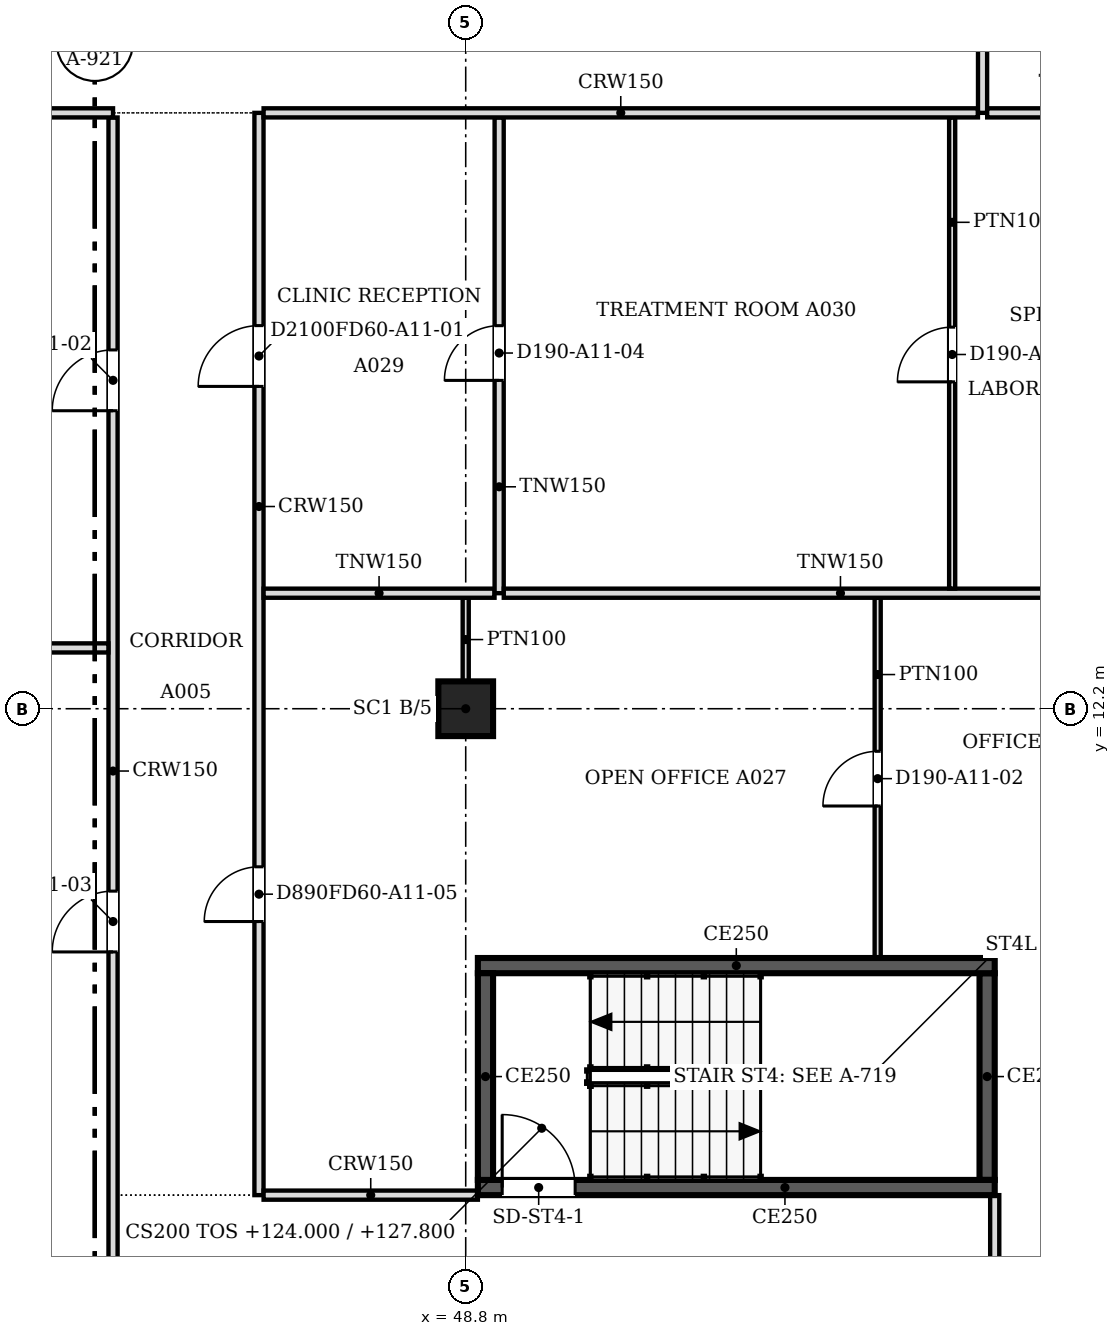
"""IFC4 building model, lengths in metres.
Left out: names, types, materials, properties, quantities, classifications, styles, units other than length and angle.
Written with IfcOpenShell. Run it as: python <this file> out.ifc"""

import sys

from ifc_helpers import new_model, si_unit, direction, frame, frame_2d, origin, origin_2d, place, context, subcontext, project, spatial, polyline, rectangle, outline, extrude, faceted_brep, source, transform, mapped, element, fill, save


model = new_model("IFC4")
c1 = context("Model", 3, precision=1e-05, world=origin(), true_north=direction((0.0, 1.0)))
c2 = subcontext(c1, "Body", "Model", "MODEL_VIEW")
j1 = project(units=[si_unit("LENGTHUNIT", "METRE"), si_unit("PLANEANGLEUNIT", "RADIAN")], contexts=[c1])
p1 = place(None, origin())
s1 = spatial("IfcSite", under=j1, at=p1, CompositionType="ELEMENT")
p2 = place(p1, origin())
s2 = spatial("IfcBuilding", under=s1, at=p2, CompositionType="ELEMENT")
p3 = place(p2, frame((0.0, 0.0, 124.0)))
s3 = spatial("IfcBuildingStorey", under=s2, at=p3, CompositionType="ELEMENT", Elevation=124.0)
p4 = place(p3, frame((48.8, 12.2, 0.0), z_axis=(0.0, 0.0, 1.0), x_axis=(1.0, 0.0, 0.0)))
e1 = element("IfcColumn", 1, at=p4, inside=s3, PredefinedType="COLUMN", context=c2, shape_type="SweptSolid", body=[
    extrude(rectangle(XDim=0.9, YDim=0.9, at=origin_2d()), origin(), (0.0, 0.0, 1.0), 3.6),
])
m1 = source(origin(), c2, "Body", "Brep", [
    faceted_brep([(0.053, -0.25, 0.0), (2.997, -0.25, 3.8), (0.053, -0.25, 7.6), (0.0, -0.25, 7.532), (0.0, -0.25, 0.068), (0.106, 0.25, 7.532), (2.944, 0.25, 3.868), (2.944, 0.25, 3.732), (0.106, 0.25, 0.068), (2.997, 0.0, 3.8), (0.053, 0.0, 0.0), (0.053, 0.0, 7.6)], [[[0, 1, 2, 3, 4]], [[5, 6, 7, 8]], [[8, 7, 9, 1, 0, 10]], [[6, 5, 11, 2, 1, 9]], [[3, 2, 11]], [[10, 0, 4]], [[8, 10, 4, 3, 11, 5]], [[9, 7, 6]]]),
])
p5 = place(p3, frame((57.569, 1.274, -3.8), z_axis=(0.0, 0.0, 1.0), x_axis=(0.707066050402, 0.707147509625, 0.0)))
e2 = element("IfcWall", 2, at=p5, inside=s3, PredefinedType="SOLIDWALL", context=c2, shape_type="MappedRepresentation", body=[
    mapped(m1, transform((0.0, 0.0, 0.0), scale=1.0)),
])
m2 = source(origin(), c2, "Body", "SweptSolid", [
    extrude(outline(polyline([(0.253, 0.666), (2.681, 3.8), (0.253, 6.934), (0.253, 0.666)])), frame((0.0, 0.26, 0.0), z_axis=(0.0, -1.0, 0.0), x_axis=(1.0, 0.0, 0.0)), (0.0, 0.0, 1.0), 0.52),
])
p6 = place(p5, origin())
e3 = element("IfcOpeningElement", 3, at=p6, cuts=e2, PredefinedType="OPENING", context=c2, shape_type="MappedRepresentation", body=[
    mapped(m2, transform((0.0, 0.0, 0.0), scale=1.0)),
])
p7 = place(p2, frame((0.0, 0.0, 127.8)))
s4 = spatial("IfcBuildingStorey", under=s2, at=p7, CompositionType="ELEMENT", Elevation=127.8)
m3 = source(origin(), c2, "Body", "Brep", [
    faceted_brep([(2.944, -0.25, 0.0), (2.997, -0.25, 0.068), (2.997, -0.25, 7.532), (2.944, -0.25, 7.6), (0.0, -0.25, 3.8), (0.053, 0.25, 3.868), (2.891, 0.25, 7.532), (2.891, 0.25, 0.068), (0.053, 0.25, 3.732), (2.944, 0.0, 0.0), (2.944, 0.0, 7.6), (0.0, 0.0, 3.8)], [[[0, 1, 2, 3, 4]], [[5, 6, 7, 8]], [[1, 0, 9]], [[10, 3, 2]], [[6, 5, 11, 4, 3, 10]], [[8, 7, 9, 0, 4, 11]], [[8, 11, 5]], [[1, 9, 7, 6, 10, 2]]]),
])
p8 = place(p7, frame((57.606, 1.312, -3.8), z_axis=(0.0, 0.0, 1.0), x_axis=(0.707147509625, 0.707066050402, 0.0)))
e4 = element("IfcWall", 4, at=p8, inside=s4, PredefinedType="SOLIDWALL", context=c2, shape_type="MappedRepresentation", body=[
    mapped(m3, transform((0.0, 0.0, 0.0), scale=1.0)),
])
m4 = source(origin(), c2, "Body", "SweptSolid", [
    extrude(outline(polyline([(2.744, 6.934), (0.316, 3.8), (2.744, 0.666), (2.744, 6.934)])), frame((0.0, 0.26, 0.0), z_axis=(0.0, -1.0, 0.0), x_axis=(1.0, 0.0, 0.0)), (0.0, 0.0, 1.0), 0.52),
])
p9 = place(p8, origin())
e5 = element("IfcOpeningElement", 5, at=p9, cuts=e4, PredefinedType="OPENING", context=c2, shape_type="MappedRepresentation", body=[
    mapped(m4, transform((0.0, 0.0, 0.0), scale=1.0)),
])
p10 = place(p3, frame((57.5, 4.325, 0.0), z_axis=(0.0, 0.0, 1.0), x_axis=(-1.0, 0.0, 0.0)))
e6 = element("IfcWall", 6, at=p10, inside=s3, PredefinedType="SOLIDWALL", context=c2, shape_type="SweptSolid", body=[
    extrude(rectangle(XDim=8.5, YDim=0.25, at=frame_2d((4.25, 0.0))), origin(), (0.0, 0.0, 1.0), 3.8),
])
m5 = source(origin(), c2, "Body", "SweptSolid", [
    extrude(rectangle(XDim=1.2, YDim=2.1, at=frame_2d((0.6, 1.05))), frame((0.0, 0.135, 0.0), z_axis=(0.0, -1.0, 0.0), x_axis=(1.0, 0.0, 0.0)), (0.0, 0.0, 1.0), 0.27),
])
p11 = place(p10, frame((6.9, 0.0, 0.0)))
e7 = element("IfcOpeningElement", 7, at=p11, cuts=e6, PredefinedType="OPENING", context=c2, shape_type="MappedRepresentation", body=[
    mapped(m5, transform((0.0, 0.0, 0.0), scale=1.0)),
])
p12 = place(p3, frame((49.125, 4.45, 0.0), z_axis=(0.0, 0.0, 1.0), x_axis=(0.0, 1.0, 0.0)))
e8 = element("IfcWall", 8, at=p12, inside=s3, PredefinedType="SOLIDWALL", context=c2, shape_type="SweptSolid", body=[
    extrude(rectangle(XDim=3.4, YDim=0.25, at=frame_2d((1.7, 0.0))), origin(), (0.0, 0.0, 1.0), 3.8),
])
p13 = place(p3, frame((49.0, 7.975, 0.0), z_axis=(0.0, 0.0, 1.0), x_axis=(1.0, 0.0, 0.0)))
e9 = element("IfcWall", 9, at=p13, inside=s3, PredefinedType="SOLIDWALL", context=c2, shape_type="SweptSolid", body=[
    extrude(rectangle(XDim=8.5, YDim=0.25, at=frame_2d((4.25, 0.0))), origin(), (0.0, 0.0, 1.0), 3.8),
])
p14 = place(p3, frame((57.375, 7.85, 0.0), z_axis=(0.0, 0.0, 1.0), x_axis=(0.0, -1.0, 0.0)))
e10 = element("IfcWall", 10, at=p14, inside=s3, PredefinedType="SOLIDWALL", context=c2, shape_type="SweptSolid", body=[
    extrude(rectangle(XDim=3.4, YDim=0.25, at=frame_2d((1.7, 0.0))), origin(), (0.0, 0.0, 1.0), 3.8),
])
p15 = place(p3, frame((43.0, 0.5, 0.0), z_axis=(0.0, 0.0, 1.0), x_axis=(0.0, 1.0, 0.0)))
e11 = element("IfcWall", 11, at=p15, inside=s3, PredefinedType="PARTITIONING", context=c2, shape_type="SweptSolid", body=[
    extrude(rectangle(XDim=21.424, YDim=0.15, at=frame_2d((10.712, 0.0))), origin(), (0.0, 0.0, 1.0), 3.067),
])
m6 = source(origin(), c2, "Body", "SweptSolid", [
    extrude(rectangle(XDim=1.0, YDim=2.1, at=frame_2d((0.5, 1.05))), frame((0.0, 0.085, 0.0), z_axis=(0.0, -1.0, 0.0), x_axis=(1.0, 0.0, 0.0)), (0.0, 0.0, 1.0), 0.17),
])
p16 = place(p15, frame((16.601, 0.0, 0.0)))
e12 = element("IfcOpeningElement", 12, at=p16, cuts=e11, PredefinedType="OPENING", context=c2, shape_type="MappedRepresentation", body=[
    mapped(m6, transform((0.0, 0.0, 0.0), scale=1.0)),
])
p17 = place(p15, frame((7.7, 0.0, 0.0)))
e13 = element("IfcOpeningElement", 13, at=p17, cuts=e11, PredefinedType="OPENING", context=c2, shape_type="MappedRepresentation", body=[
    mapped(m6, transform((0.0, 0.0, 0.0), scale=1.0)),
])
p18 = place(p3, frame((57.5, 1.559, 0.0), z_axis=(0.0, 0.0, 1.0), x_axis=(0.0, 1.0, 0.0)))
e14 = element("IfcWall", 14, at=p18, inside=s3, PredefinedType="PARTITIONING", context=c2, shape_type="SweptSolid", body=[
    extrude(rectangle(XDim=2.641, YDim=0.15, at=frame_2d((1.32, 0.0))), origin(), (0.0, 0.0, 1.0), 3.067),
])
p19 = place(p3, frame((45.4, 22.0, 0.0), z_axis=(0.0, 0.0, 1.0), x_axis=(0.0, -1.0, 0.0)))
e15 = element("IfcWall", 15, at=p19, inside=s3, PredefinedType="PARTITIONING", context=c2, shape_type="SweptSolid", body=[
    extrude(rectangle(XDim=17.8, YDim=0.15, at=frame_2d((8.9, 0.0))), origin(), (0.0, 0.0, 1.0), 3.067),
])
p20 = place(p19, frame((3.499, 0.0, 0.0)))
e16 = element("IfcOpeningElement", 16, at=p20, cuts=e15, PredefinedType="OPENING", context=c2, shape_type="MappedRepresentation", body=[
    mapped(m6, transform((0.0, 0.0, 0.0), scale=1.0)),
])
m7 = source(origin(), c2, "Body", "SweptSolid", [
    extrude(rectangle(XDim=0.9, YDim=2.1, at=frame_2d((0.45, 1.05))), frame((0.0, 0.085, 0.0), z_axis=(0.0, -1.0, 0.0), x_axis=(1.0, 0.0, 0.0)), (0.0, 0.0, 1.0), 0.17),
])
p21 = place(p19, frame((12.4, 0.0, 0.0)))
e17 = element("IfcOpeningElement", 17, at=p21, cuts=e15, PredefinedType="OPENING", context=c2, shape_type="MappedRepresentation", body=[
    mapped(m7, transform((0.0, 0.0, 0.0), scale=1.0)),
])
p22 = place(p3, frame((45.476, 4.2, 0.0), z_axis=(0.0, 0.0, 1.0), x_axis=(1.0, 0.0, 0.0)))
e18 = element("IfcWall", 18, at=p22, inside=s3, PredefinedType="PARTITIONING", context=c2, shape_type="SweptSolid", body=[
    extrude(rectangle(XDim=3.524, YDim=0.15, at=frame_2d((1.762, 0.0))), origin(), (0.0, 0.0, 1.0), 3.067),
])
p23 = place(p3, frame((55.575, 14.024, 0.0), z_axis=(0.0, 0.0, 1.0), x_axis=(0.0, -1.0, 0.0)))
e19 = element("IfcWall", 19, at=p23, inside=s3, PredefinedType="PARTITIONING", context=c2, shape_type="SweptSolid", body=[
    extrude(rectangle(XDim=5.924, YDim=0.1, at=frame_2d((2.962, 0.0))), origin(), (0.0, 0.0, 1.0), 3.067),
])
m8 = source(origin(), c2, "Body", "SweptSolid", [
    extrude(rectangle(XDim=0.9, YDim=2.1, at=frame_2d((0.45, 1.05))), frame((0.0, 0.06, 0.0), z_axis=(0.0, -1.0, 0.0), x_axis=(1.0, 0.0, 0.0)), (0.0, 0.0, 1.0), 0.12),
])
p24 = place(p23, frame((2.524, 0.0, 0.0)))
e20 = element("IfcOpeningElement", 20, at=p24, cuts=e19, PredefinedType="OPENING", context=c2, shape_type="MappedRepresentation", body=[
    mapped(m8, transform((0.0, 0.0, 0.0), scale=1.0)),
])
p25 = place(p3, frame((48.8, 12.65, 0.0), z_axis=(0.0, 0.0, 1.0), x_axis=(0.0, 1.0, 0.0)))
e21 = element("IfcWall", 21, at=p25, inside=s3, PredefinedType="PARTITIONING", context=c2, shape_type="SweptSolid", body=[
    extrude(rectangle(XDim=1.375, YDim=0.1, at=frame_2d((0.688, 0.0))), origin(), (0.0, 0.0, 1.0), 3.067),
])
p26 = place(p3, frame((24.55, 13.2, 0.0), z_axis=(0.0, 0.0, 1.0), x_axis=(1.0, 0.0, 0.0)))
e22 = element("IfcWall", 22, at=p26, inside=s3, PredefinedType="PARTITIONING", context=c2, shape_type="SweptSolid", body=[
    extrude(rectangle(XDim=18.374, YDim=0.15, at=frame_2d((9.187, 0.0))), origin(), (0.0, 0.0, 1.0), 3.067),
])
p27 = place(p3, frame((45.476, 14.1, 0.0), z_axis=(0.0, 0.0, 1.0), x_axis=(1.0, 0.0, 0.0)))
e23 = element("IfcWall", 23, at=p27, inside=s3, PredefinedType="PARTITIONING", context=c2, shape_type="SweptSolid", body=[
    extrude(rectangle(XDim=3.798, YDim=0.15, at=frame_2d((1.899, 0.0))), origin(), (0.0, 0.0, 1.0), 3.067),
])
p28 = place(p3, frame((49.35, 21.924, 0.0), z_axis=(0.0, 0.0, 1.0), x_axis=(0.0, -1.0, 0.0)))
e24 = element("IfcWall", 24, at=p28, inside=s3, PredefinedType="PARTITIONING", context=c2, shape_type="SweptSolid", body=[
    extrude(rectangle(XDim=7.824, YDim=0.15, at=frame_2d((3.912, 0.0))), origin(), (0.0, 0.0, 1.0), 3.067),
])
p29 = place(p28, frame((3.424, 0.0, 0.0)))
e25 = element("IfcOpeningElement", 25, at=p29, cuts=e24, PredefinedType="OPENING", context=c2, shape_type="MappedRepresentation", body=[
    mapped(m7, transform((0.0, 0.0, 0.0), scale=1.0)),
])
p30 = place(p3, frame((49.426, 14.1, 0.0), z_axis=(0.0, 0.0, 1.0), x_axis=(1.0, 0.0, 0.0)))
e26 = element("IfcWall", 26, at=p30, inside=s3, PredefinedType="PARTITIONING", context=c2, shape_type="SweptSolid", body=[
    extrude(rectangle(XDim=11.074, YDim=0.15, at=frame_2d((5.537, 0.0))), origin(), (0.0, 0.0, 1.0), 3.067),
])
p31 = place(p3, frame((56.8, 21.924, 0.0), z_axis=(0.0, 0.0, 1.0), x_axis=(0.0, -1.0, 0.0)))
e27 = element("IfcWall", 27, at=p31, inside=s3, PredefinedType="PARTITIONING", context=c2, shape_type="SweptSolid", body=[
    extrude(rectangle(XDim=7.748, YDim=0.1, at=frame_2d((3.874, 0.0))), origin(), (0.0, 0.0, 1.0), 3.067),
])
p32 = place(p31, frame((3.448, 0.0, 0.0)))
e28 = element("IfcOpeningElement", 28, at=p32, cuts=e27, PredefinedType="OPENING", context=c2, shape_type="MappedRepresentation", body=[
    mapped(m8, transform((0.0, 0.0, 0.0), scale=1.0)),
])
p33 = place(p3, frame((30.5, 22.0, 0.0), z_axis=(0.0, 0.0, 1.0), x_axis=(1.0, 0.0, 0.0)))
e29 = element("IfcWall", 29, at=p33, inside=s3, PredefinedType="PARTITIONING", context=c2, shape_type="SweptSolid", body=[
    extrude(rectangle(XDim=12.5, YDim=0.15, at=frame_2d((6.25, 0.0))), origin(), (0.0, 0.0, 1.0), 3.067),
])
p34 = place(p3, frame((45.476, 22.0, 0.0), z_axis=(0.0, 0.0, 1.0), x_axis=(1.0, 0.0, 0.0)))
e30 = element("IfcWall", 30, at=p34, inside=s3, PredefinedType="PARTITIONING", context=c2, shape_type="SweptSolid", body=[
    extrude(rectangle(XDim=11.748, YDim=0.15, at=frame_2d((5.874, 0.0))), origin(), (0.0, 0.0, 1.0), 3.067),
])
p35 = place(p3, frame((57.3, 30.6, 0.0), z_axis=(0.0, 0.0, 1.0), x_axis=(0.0, -1.0, 0.0)))
e31 = element("IfcWall", 31, at=p35, inside=s3, PredefinedType="PARTITIONING", context=c2, shape_type="SweptSolid", body=[
    extrude(rectangle(XDim=8.6, YDim=0.15, at=frame_2d((4.3, 0.0))), origin(), (0.0, 0.0, 1.0), 3.067),
])
p36 = place(p35, frame((3.9, 0.0, 0.0)))
e32 = element("IfcOpeningElement", 32, at=p36, cuts=e31, PredefinedType="OPENING", context=c2, shape_type="MappedRepresentation", body=[
    mapped(m7, transform((0.0, 0.0, 0.0), scale=1.0)),
])
p37 = place(p3, frame((57.376, 22.0, 0.0), z_axis=(0.0, 0.0, 1.0), x_axis=(1.0, 0.0, 0.0)))
e33 = element("IfcWall", 33, at=p37, inside=s3, PredefinedType="PARTITIONING", context=c2, shape_type="SweptSolid", body=[
    extrude(rectangle(XDim=3.124, YDim=0.15, at=frame_2d((1.562, 0.0))), origin(), (0.0, 0.0, 1.0), 3.067),
])
m9 = source(origin(), c2, "Body", "SweptSolid", [
    extrude(rectangle(XDim=1.2, YDim=2.1, at=frame_2d((0.6, 1.05))), frame((0.0, 0.025, 0.0), z_axis=(0.0, -1.0, 0.0), x_axis=(1.0, 0.0, 0.0)), (0.0, 0.0, 1.0), 0.05),
])
p38 = place(p11, origin())
e34 = element("IfcDoor", 34, at=p38, inside=s3, OperationType="SINGLE_SWING_RIGHT", PredefinedType="DOOR", context=c2, shape_type="MappedRepresentation", body=[
    mapped(m9, transform((0.0, 0.0, 0.0), scale=1.0)),
])
fill(e7, e34)
m10 = source(origin(), c2, "Body", "SweptSolid", [
    extrude(rectangle(XDim=0.9, YDim=2.1, at=frame_2d((0.45, 1.05))), frame((0.0, 0.025, 0.0), z_axis=(0.0, -1.0, 0.0), x_axis=(1.0, 0.0, 0.0)), (0.0, 0.0, 1.0), 0.05),
])
p39 = place(p24, origin())
e35 = element("IfcDoor", 35, at=p39, inside=s3, OperationType="SINGLE_SWING_RIGHT", PredefinedType="DOOR", context=c2, shape_type="MappedRepresentation", body=[
    mapped(m10, transform((0.0, 0.0, 0.0), scale=1.0)),
])
fill(e20, e35)
p40 = place(p32, origin())
e36 = element("IfcDoor", 36, at=p40, inside=s3, OperationType="SINGLE_SWING_RIGHT", PredefinedType="DOOR", context=c2, shape_type="MappedRepresentation", body=[
    mapped(m10, transform((0.0, 0.0, 0.0), scale=1.0)),
])
fill(e28, e36)
p41 = place(p29, origin())
e37 = element("IfcDoor", 37, at=p41, inside=s3, OperationType="SINGLE_SWING_RIGHT", PredefinedType="DOOR", context=c2, shape_type="MappedRepresentation", body=[
    mapped(m10, transform((0.0, 0.0, 0.0), scale=1.0)),
])
fill(e25, e37)
m11 = source(origin(), c2, "Body", "SweptSolid", [
    extrude(rectangle(XDim=1.0, YDim=2.1, at=frame_2d((0.5, 1.05))), frame((0.0, 0.025, 0.0), z_axis=(0.0, -1.0, 0.0), x_axis=(1.0, 0.0, 0.0)), (0.0, 0.0, 1.0), 0.05),
])
p42 = place(p20, origin())
e38 = element("IfcDoor", 38, at=p42, inside=s3, OperationType="SINGLE_SWING_RIGHT", PredefinedType="DOOR", context=c2, shape_type="MappedRepresentation", body=[
    mapped(m11, transform((0.0, 0.0, 0.0), scale=1.0)),
])
fill(e16, e38)
p43 = place(p16, origin())
e39 = element("IfcDoor", 39, at=p43, inside=s3, OperationType="SINGLE_SWING_LEFT", PredefinedType="DOOR", context=c2, shape_type="MappedRepresentation", body=[
    mapped(m11, transform((0.0, 0.0, 0.0), scale=1.0)),
])
fill(e12, e39)
p44 = place(p17, origin())
e40 = element("IfcDoor", 40, at=p44, inside=s3, OperationType="SINGLE_SWING_LEFT", PredefinedType="DOOR", context=c2, shape_type="MappedRepresentation", body=[
    mapped(m11, transform((0.0, 0.0, 0.0), scale=1.0)),
])
fill(e13, e40)
p45 = place(p21, origin())
e41 = element("IfcDoor", 41, at=p45, inside=s3, OperationType="SINGLE_SWING_RIGHT", PredefinedType="DOOR", context=c2, shape_type="MappedRepresentation", body=[
    mapped(m10, transform((0.0, 0.0, 0.0), scale=1.0)),
])
fill(e17, e41)
save(model, sys.argv[1])
